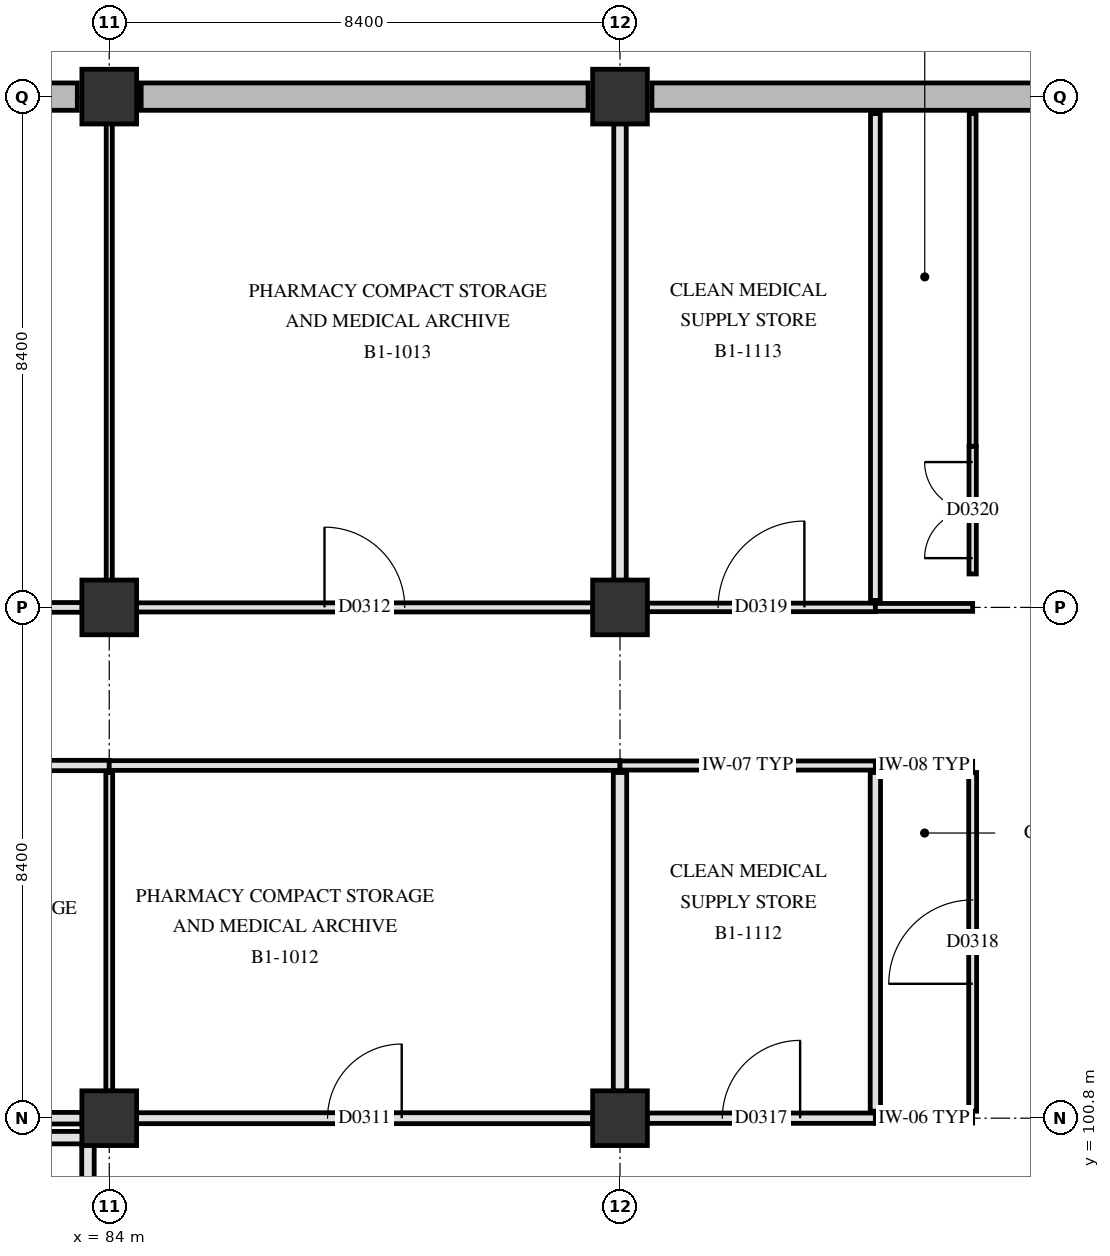
"""IFC4 building model, lengths in metres.
Left out: names, types, materials, properties, quantities, classifications, styles, units other than length and angle.
Written with IfcOpenShell. Run it as: python <this file> out.ifc"""

import sys

from ifc_helpers import new_model, si_unit, direction, frame, frame_2d, origin, origin_2d, place, context, subcontext, project, spatial, rectangle, extrude, element, fill, save


model = new_model("IFC4")
c1 = context("Model", 3, precision=1e-05, world=origin(), true_north=direction((0.0, 1.0)))
c2 = subcontext(c1, "Body", "Model", "MODEL_VIEW")
j1 = project(units=[si_unit("LENGTHUNIT", "METRE"), si_unit("PLANEANGLEUNIT", "RADIAN")], contexts=[c1])
p1 = place(None, origin())
s1 = spatial("IfcSite", under=j1, at=p1, CompositionType="ELEMENT")
p2 = place(p1, origin())
s2 = spatial("IfcBuilding", under=s1, at=p2, CompositionType="ELEMENT")
p3 = place(p2, frame((0.0, 0.0, -5.4)))
s3 = spatial("IfcBuildingStorey", under=s2, at=p3, CompositionType="ELEMENT", Elevation=-5.4)
for number, where, z_axis, x_axis in (
    (1, (84.0, 100.8, 0.0), (0.0, 0.0, 1.0), (1.0, 0.0, 0.0)),
    (2, (84.0, 109.2, 0.0), (0.0, 0.0, 1.0), (1.0, 0.0, 0.0)),
    (3, (84.0, 117.6, 0.0), (0.0, 0.0, 1.0), (1.0, 0.0, 0.0)),
    (4, (92.4, 100.8, 0.0), (0.0, 0.0, 1.0), (1.0, 0.0, 0.0)),
    (5, (92.4, 109.2, 0.0), (0.0, 0.0, 1.0), (1.0, 0.0, 0.0)),
    (6, (92.4, 117.6, 0.0), (0.0, 0.0, 1.0), (1.0, 0.0, 0.0)),
):
    element("IfcColumn", number, at=place(p3, frame(where, z_axis=z_axis, x_axis=x_axis)), inside=s3, PredefinedType="COLUMN", context=c2, shape_type="SweptSolid", body=[
        extrude(rectangle(XDim=0.9, YDim=0.9, at=origin_2d()), origin(), (0.0, 0.0, 1.0), 5.4),
    ])
for number, where, z_axis, x_axis in (
    (7, (76.125, 117.6, 0.0), (0.0, 0.0, 1.0), (1.0, 0.0, 0.0)),
    (8, (84.525, 117.6, 0.0), (0.0, 0.0, 1.0), (1.0, 0.0, 0.0)),
):
    element("IfcWall", number, at=place(p3, frame(where, z_axis=z_axis, x_axis=x_axis)), inside=s3, PredefinedType="SOLIDWALL", context=c2, shape_type="SweptSolid", body=[
        extrude(rectangle(XDim=7.35, YDim=0.45, at=frame_2d((3.675, 0.0))), origin(), (0.0, 0.0, 1.0), 5.08),
    ])
p4 = place(p3, frame((92.925, 117.6, 0.0), z_axis=(0.0, 0.0, 1.0), x_axis=(1.0, 0.0, 0.0)))
e9 = element("IfcWall", 9, at=p4, inside=s3, PredefinedType="SOLIDWALL", context=c2, shape_type="SweptSolid", body=[
    extrude(rectangle(XDim=7.35, YDim=0.45, at=frame_2d((3.675, 0.0))), origin(), (0.0, 0.0, 1.0), 5.08),
])
p5 = place(p3, frame((83.65, 96.24, 0.0), z_axis=(0.0, 0.0, 1.0), x_axis=(0.0, 1.0, 0.0)))
e10 = element("IfcWall", 10, at=p5, inside=s3, PredefinedType="PARTITIONING", context=c2, shape_type="SweptSolid", body=[
    extrude(rectangle(XDim=4.12, YDim=0.205, at=frame_2d((2.06, 0.0))), origin(), (0.0, 0.0, 1.0), 5.07),
])
p6 = place(p3, frame((80.08, 100.48, 0.0), z_axis=(0.0, 0.0, 1.0), x_axis=(1.0, 0.0, 0.0)))
e11 = element("IfcWall", 11, at=p6, inside=s3, PredefinedType="PARTITIONING", context=c2, shape_type="SweptSolid", body=[
    extrude(rectangle(XDim=3.57, YDim=0.205, at=frame_2d((1.785, 0.0))), origin(), (0.0, 0.0, 1.0), 4.42),
])
p7 = place(p3, frame((78.95, 100.8, 0.0), z_axis=(0.0, 0.0, 1.0), x_axis=(1.0, 0.0, 0.0)))
e12 = element("IfcWall", 12, at=p7, inside=s3, PredefinedType="PARTITIONING", context=c2, shape_type="SweptSolid", body=[
    extrude(rectangle(XDim=4.605, YDim=0.19, at=frame_2d((2.302, 0.0))), origin(), (0.0, 0.0, 1.0), 4.42),
])
p8 = place(p3, frame((84.445, 100.8, 0.0), z_axis=(0.0, 0.0, 1.0), x_axis=(1.0, 0.0, 0.0)))
e13 = element("IfcWall", 13, at=p8, inside=s3, PredefinedType="PARTITIONING", context=c2, shape_type="SweptSolid", body=[
    extrude(rectangle(XDim=7.51, YDim=0.18, at=frame_2d((3.755, 0.0))), origin(), (0.0, 0.0, 1.0), 4.42),
])
p9 = place(p8, frame((3.145, 0.0, 0.0)))
e14 = element("IfcOpeningElement", 14, at=p9, cuts=e13, PredefinedType="OPENING", context=c2, shape_type="SweptSolid", body=[
    extrude(rectangle(XDim=1.22, YDim=2.18, at=frame_2d((0.61, 1.09))), frame((0.0, 0.1, 0.0), z_axis=(0.0, -1.0, 0.0), x_axis=(1.0, 0.0, 0.0)), (0.0, 0.0, 1.0), 0.2),
])
p10 = place(p3, frame((92.845, 100.8, 0.0), z_axis=(0.0, 0.0, 1.0), x_axis=(1.0, 0.0, 0.0)))
e15 = element("IfcWall", 15, at=p10, inside=s3, PredefinedType="PARTITIONING", context=c2, shape_type="SweptSolid", body=[
    extrude(rectangle(XDim=3.755, YDim=0.17, at=frame_2d((1.877, 0.0))), origin(), (0.0, 0.0, 1.0), 4.42),
])
p11 = place(p10, frame((1.238, 0.0, 0.0)))
e16 = element("IfcOpeningElement", 16, at=p11, cuts=e15, PredefinedType="OPENING", context=c2, shape_type="SweptSolid", body=[
    extrude(rectangle(XDim=1.28, YDim=2.18, at=frame_2d((0.64, 1.09))), frame((0.0, 0.095, 0.0), z_axis=(0.0, -1.0, 0.0), x_axis=(1.0, 0.0, 0.0)), (0.0, 0.0, 1.0), 0.19),
])
p12 = place(p3, frame((96.6, 100.8, 0.0), z_axis=(0.0, 0.0, 1.0), x_axis=(1.0, 0.0, 0.0)))
e17 = element("IfcWall", 17, at=p12, inside=s3, PredefinedType="PARTITIONING", context=c2, shape_type="SweptSolid", body=[
    extrude(rectangle(XDim=1.6, YDim=0.16, at=frame_2d((0.8, 0.0))), origin(), (0.0, 0.0, 1.0), 4.42),
])
p13 = place(p3, frame((75.6, 106.6, 0.0), z_axis=(0.0, 0.0, 1.0), x_axis=(1.0, 0.0, 0.0)))
e18 = element("IfcWall", 18, at=p13, inside=s3, PredefinedType="PARTITIONING", context=c2, shape_type="SweptSolid", body=[
    extrude(rectangle(XDim=8.4, YDim=0.17, at=frame_2d((4.2, 0.0))), origin(), (0.0, 0.0, 1.0), 4.47),
])
p14 = place(p13, frame((3.69, 0.0, 0.0)))
e19 = element("IfcOpeningElement", 19, at=p14, cuts=e18, PredefinedType="OPENING", context=c2, shape_type="SweptSolid", body=[
    extrude(rectangle(XDim=1.02, YDim=2.12, at=frame_2d((0.51, 1.06))), frame((0.0, 0.095, 0.0), z_axis=(0.0, -1.0, 0.0), x_axis=(1.0, 0.0, 0.0)), (0.0, 0.0, 1.0), 0.19),
])
p15 = place(p3, frame((84.0, 106.6, 0.0), z_axis=(0.0, 0.0, 1.0), x_axis=(1.0, 0.0, 0.0)))
e20 = element("IfcWall", 20, at=p15, inside=s3, PredefinedType="PARTITIONING", context=c2, shape_type="SweptSolid", body=[
    extrude(rectangle(XDim=8.4, YDim=0.16, at=frame_2d((4.2, 0.0))), origin(), (0.0, 0.0, 1.0), 4.47),
])
p16 = place(p3, frame((92.4, 106.6, 0.0), z_axis=(0.0, 0.0, 1.0), x_axis=(1.0, 0.0, 0.0)))
e21 = element("IfcWall", 21, at=p16, inside=s3, PredefinedType="PARTITIONING", context=c2, shape_type="SweptSolid", body=[
    extrude(rectangle(XDim=4.2, YDim=0.15, at=frame_2d((2.1, 0.0))), origin(), (0.0, 0.0, 1.0), 4.47),
])
p17 = place(p3, frame((96.6, 106.6, 0.0), z_axis=(0.0, 0.0, 1.0), x_axis=(1.0, 0.0, 0.0)))
e22 = element("IfcWall", 22, at=p17, inside=s3, PredefinedType="PARTITIONING", context=c2, shape_type="SweptSolid", body=[
    extrude(rectangle(XDim=1.6, YDim=0.14, at=frame_2d((0.8, 0.0))), origin(), (0.0, 0.0, 1.0), 5.07),
])
p18 = place(p3, frame((76.045, 109.2, 0.0), z_axis=(0.0, 0.0, 1.0), x_axis=(1.0, 0.0, 0.0)))
e23 = element("IfcWall", 23, at=p18, inside=s3, PredefinedType="PARTITIONING", context=c2, shape_type="SweptSolid", body=[
    extrude(rectangle(XDim=7.51, YDim=0.16, at=frame_2d((3.755, 0.0))), origin(), (0.0, 0.0, 1.0), 4.42),
])
p19 = place(p18, frame((3.215, 0.0, 0.0)))
e24 = element("IfcOpeningElement", 24, at=p19, cuts=e23, PredefinedType="OPENING", context=c2, shape_type="SweptSolid", body=[
    extrude(rectangle(XDim=1.08, YDim=2.12, at=frame_2d((0.54, 1.06))), frame((0.0, 0.09, 0.0), z_axis=(0.0, -1.0, 0.0), x_axis=(1.0, 0.0, 0.0)), (0.0, 0.0, 1.0), 0.18),
])
p20 = place(p3, frame((84.445, 109.2, 0.0), z_axis=(0.0, 0.0, 1.0), x_axis=(1.0, 0.0, 0.0)))
e25 = element("IfcWall", 25, at=p20, inside=s3, PredefinedType="PARTITIONING", context=c2, shape_type="SweptSolid", body=[
    extrude(rectangle(XDim=7.51, YDim=0.15, at=frame_2d((3.755, 0.0))), origin(), (0.0, 0.0, 1.0), 4.42),
])
p21 = place(p20, frame((3.095, 0.0, 0.0)))
e26 = element("IfcOpeningElement", 26, at=p21, cuts=e25, PredefinedType="OPENING", context=c2, shape_type="SweptSolid", body=[
    extrude(rectangle(XDim=1.32, YDim=2.18, at=frame_2d((0.66, 1.09))), frame((0.0, 0.085, 0.0), z_axis=(0.0, -1.0, 0.0), x_axis=(1.0, 0.0, 0.0)), (0.0, 0.0, 1.0), 0.17),
])
p22 = place(p3, frame((92.845, 109.2, 0.0), z_axis=(0.0, 0.0, 1.0), x_axis=(1.0, 0.0, 0.0)))
e27 = element("IfcWall", 27, at=p22, inside=s3, PredefinedType="PARTITIONING", context=c2, shape_type="SweptSolid", body=[
    extrude(rectangle(XDim=3.755, YDim=0.14, at=frame_2d((1.877, 0.0))), origin(), (0.0, 0.0, 1.0), 4.42),
])
p23 = place(p22, frame((1.167, 0.0, 0.0)))
e28 = element("IfcOpeningElement", 28, at=p23, cuts=e27, PredefinedType="OPENING", context=c2, shape_type="SweptSolid", body=[
    extrude(rectangle(XDim=1.42, YDim=2.22, at=frame_2d((0.71, 1.11))), frame((0.0, 0.08, 0.0), z_axis=(0.0, -1.0, 0.0), x_axis=(1.0, 0.0, 0.0)), (0.0, 0.0, 1.0), 0.16),
])
p24 = place(p3, frame((96.6, 109.2, 0.0), z_axis=(0.0, 0.0, 1.0), x_axis=(1.0, 0.0, 0.0)))
e29 = element("IfcWall", 29, at=p24, inside=s3, PredefinedType="PARTITIONING", context=c2, shape_type="SweptSolid", body=[
    extrude(rectangle(XDim=1.6, YDim=0.13, at=frame_2d((0.8, 0.0))), origin(), (0.0, 0.0, 1.0), 4.42),
])
p25 = place(p3, frame((84.0, 101.245, 0.0), z_axis=(0.0, 0.0, 1.0), x_axis=(0.0, 1.0, 0.0)))
e30 = element("IfcWall", 30, at=p25, inside=s3, PredefinedType="PARTITIONING", context=c2, shape_type="SweptSolid", body=[
    extrude(rectangle(XDim=5.24, YDim=0.112, at=frame_2d((2.62, 0.0))), origin(), (0.0, 0.0, 1.0), 4.47),
])
p26 = place(p3, frame((84.0, 109.645, 0.0), z_axis=(0.0, 0.0, 1.0), x_axis=(0.0, 1.0, 0.0)))
e31 = element("IfcWall", 31, at=p26, inside=s3, PredefinedType="PARTITIONING", context=c2, shape_type="SweptSolid", body=[
    extrude(rectangle(XDim=7.51, YDim=0.1, at=frame_2d((3.755, 0.0))), origin(), (0.0, 0.0, 1.0), 4.47),
])
p27 = place(p3, frame((92.4, 101.245, 0.0), z_axis=(0.0, 0.0, 1.0), x_axis=(0.0, 1.0, 0.0)))
e32 = element("IfcWall", 32, at=p27, inside=s3, PredefinedType="PARTITIONING", context=c2, shape_type="SweptSolid", body=[
    extrude(rectangle(XDim=5.24, YDim=0.22, at=frame_2d((2.62, 0.0))), origin(), (0.0, 0.0, 1.0), 4.47),
])
p28 = place(p3, frame((92.4, 109.645, 0.0), z_axis=(0.0, 0.0, 1.0), x_axis=(0.0, 1.0, 0.0)))
e33 = element("IfcWall", 33, at=p28, inside=s3, PredefinedType="PARTITIONING", context=c2, shape_type="SweptSolid", body=[
    extrude(rectangle(XDim=7.51, YDim=0.205, at=frame_2d((3.755, 0.0))), origin(), (0.0, 0.0, 1.0), 4.47),
])
p29 = place(p3, frame((96.6, 100.915, 0.0), z_axis=(0.0, 0.0, 1.0), x_axis=(0.0, 1.0, 0.0)))
e34 = element("IfcWall", 34, at=p29, inside=s3, PredefinedType="PARTITIONING", context=c2, shape_type="SweptSolid", body=[
    extrude(rectangle(XDim=5.57, YDim=0.17, at=frame_2d((2.785, 0.0))), origin(), (0.0, 0.0, 1.0), 4.42),
])
p30 = place(p3, frame((96.6, 109.315, 0.0), z_axis=(0.0, 0.0, 1.0), x_axis=(0.0, 1.0, 0.0)))
e35 = element("IfcWall", 35, at=p30, inside=s3, PredefinedType="PARTITIONING", context=c2, shape_type="SweptSolid", body=[
    extrude(rectangle(XDim=8.005, YDim=0.16, at=frame_2d((4.002, 0.0))), origin(), (0.0, 0.0, 1.0), 4.42),
])
p31 = place(p3, frame((98.2, 100.915, 0.0), z_axis=(0.0, 0.0, 1.0), x_axis=(0.0, 1.0, 0.0)))
e36 = element("IfcWall", 36, at=p31, inside=s3, PredefinedType="PARTITIONING", context=c2, shape_type="SweptSolid", body=[
    extrude(rectangle(XDim=5.57, YDim=0.13, at=frame_2d((2.785, 0.0))), origin(), (0.0, 0.0, 1.0), 4.42),
])
p32 = place(p31, frame((2.095, 0.0, 0.0)))
e37 = element("IfcOpeningElement", 37, at=p32, cuts=e36, PredefinedType="OPENING", context=c2, shape_type="SweptSolid", body=[
    extrude(rectangle(XDim=1.38, YDim=2.22, at=frame_2d((0.69, 1.11))), frame((0.0, 0.075, 0.0), z_axis=(0.0, -1.0, 0.0), x_axis=(1.0, 0.0, 0.0)), (0.0, 0.0, 1.0), 0.15),
])
p33 = place(p3, frame((98.2, 109.75, 0.0), z_axis=(0.0, 0.0, 1.0), x_axis=(0.0, 1.0, 0.0)))
e38 = element("IfcWall", 38, at=p33, inside=s3, PredefinedType="PARTITIONING", context=c2, shape_type="SweptSolid", body=[
    extrude(rectangle(XDim=2.1, YDim=0.12, at=frame_2d((1.05, 0.0))), origin(), (0.0, 0.0, 1.0), 5.07),
])
p34 = place(p33, frame((0.26, 0.0, 0.0)))
e39 = element("IfcOpeningElement", 39, at=p34, cuts=e38, PredefinedType="OPENING", context=c2, shape_type="SweptSolid", body=[
    extrude(rectangle(XDim=1.58, YDim=2.22, at=frame_2d((0.79, 1.11))), frame((0.0, 0.07, 0.0), z_axis=(0.0, -1.0, 0.0), x_axis=(1.0, 0.0, 0.0)), (0.0, 0.0, 1.0), 0.14),
])
p35 = place(p3, frame((98.2, 111.85, 0.0), z_axis=(0.0, 0.0, 1.0), x_axis=(0.0, 1.0, 0.0)))
e40 = element("IfcWall", 40, at=p35, inside=s3, PredefinedType="PARTITIONING", context=c2, shape_type="SweptSolid", body=[
    extrude(rectangle(XDim=5.47, YDim=0.112, at=frame_2d((2.735, 0.0))), origin(), (0.0, 0.0, 1.0), 5.07),
])
p36 = place(p9, origin())
e41 = element("IfcDoor", 41, at=p36, inside=s3, OperationType="SINGLE_SWING_RIGHT", PredefinedType="DOOR", context=c2, shape_type="SweptSolid", body=[
    extrude(rectangle(XDim=1.22, YDim=2.18, at=frame_2d((0.61, 1.09))), frame((0.0, 0.025, 0.0), z_axis=(0.0, -1.0, 0.0), x_axis=(1.0, 0.0, 0.0)), (0.0, 0.0, 1.0), 0.05),
])
fill(e14, e41)
p37 = place(p21, origin())
e42 = element("IfcDoor", 42, at=p37, inside=s3, OperationType="SINGLE_SWING_LEFT", PredefinedType="DOOR", context=c2, shape_type="SweptSolid", body=[
    extrude(rectangle(XDim=1.32, YDim=2.18, at=frame_2d((0.66, 1.09))), frame((0.0, 0.025, 0.0), z_axis=(0.0, -1.0, 0.0), x_axis=(1.0, 0.0, 0.0)), (0.0, 0.0, 1.0), 0.05),
])
fill(e26, e42)
p38 = place(p11, origin())
e43 = element("IfcDoor", 43, at=p38, inside=s3, OperationType="SINGLE_SWING_RIGHT", PredefinedType="DOOR", context=c2, shape_type="SweptSolid", body=[
    extrude(rectangle(XDim=1.28, YDim=2.18, at=frame_2d((0.64, 1.09))), frame((0.0, 0.025, 0.0), z_axis=(0.0, -1.0, 0.0), x_axis=(1.0, 0.0, 0.0)), (0.0, 0.0, 1.0), 0.05),
])
fill(e16, e43)
p39 = place(p32, origin())
e44 = element("IfcDoor", 44, at=p39, inside=s3, OperationType="SINGLE_SWING_LEFT", PredefinedType="DOOR", context=c2, shape_type="SweptSolid", body=[
    extrude(rectangle(XDim=1.38, YDim=2.22, at=frame_2d((0.69, 1.11))), frame((0.0, 0.025, 0.0), z_axis=(0.0, -1.0, 0.0), x_axis=(1.0, 0.0, 0.0)), (0.0, 0.0, 1.0), 0.05),
])
fill(e37, e44)
p40 = place(p23, origin())
e45 = element("IfcDoor", 45, at=p40, inside=s3, OperationType="SINGLE_SWING_RIGHT", PredefinedType="DOOR", context=c2, shape_type="SweptSolid", body=[
    extrude(rectangle(XDim=1.42, YDim=2.22, at=frame_2d((0.71, 1.11))), frame((0.0, 0.025, 0.0), z_axis=(0.0, -1.0, 0.0), x_axis=(1.0, 0.0, 0.0)), (0.0, 0.0, 1.0), 0.05),
])
fill(e28, e45)
p41 = place(p34, origin())
e46 = element("IfcDoor", 46, at=p41, inside=s3, OperationType="DOUBLE_SWING_LEFT", PredefinedType="DOOR", context=c2, shape_type="SweptSolid", body=[
    extrude(rectangle(XDim=1.58, YDim=2.22, at=frame_2d((0.79, 1.11))), frame((0.0, 0.025, 0.0), z_axis=(0.0, -1.0, 0.0), x_axis=(1.0, 0.0, 0.0)), (0.0, 0.0, 1.0), 0.05),
])
fill(e39, e46)
save(model, sys.argv[1])
